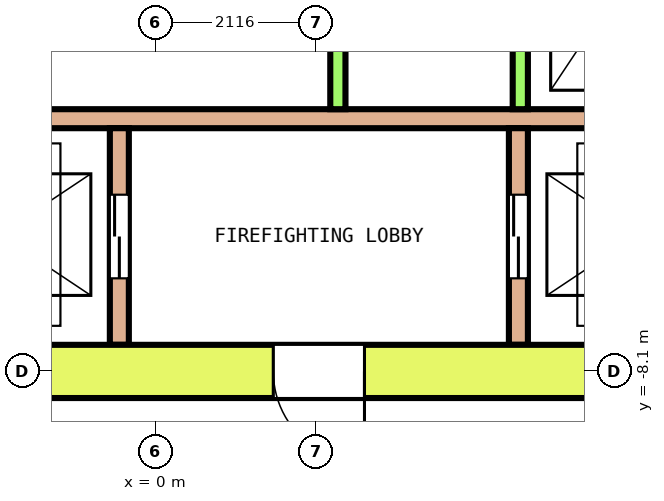
"""IFC4 building model, lengths in metres.
Left out: names, types, materials, properties, quantities, classifications, styles, units other than length and angle.
Written with IfcOpenShell. Run it as: python <this file> out.ifc"""

import sys

from ifc_helpers import new_model, si_unit, direction, frame, frame_2d, origin, place, context, subcontext, project, spatial, rectangle, extrude, element, fill, save


model = new_model("IFC4")
c1 = context("Model", 3, precision=1e-05, world=origin(), true_north=direction((0.0, 1.0)))
c2 = subcontext(c1, "Body", "Model", "MODEL_VIEW")
j1 = project(units=[si_unit("LENGTHUNIT", "METRE"), si_unit("PLANEANGLEUNIT", "RADIAN")], contexts=[c1])
p1 = place(None, origin())
s1 = spatial("IfcSite", under=j1, at=p1, CompositionType="ELEMENT")
p2 = place(p1, origin())
s2 = spatial("IfcBuilding", under=s1, at=p2, CompositionType="ELEMENT")
p3 = place(p2, frame((0.0, 0.0, 149.6)))
s3 = spatial("IfcBuildingStorey", under=s2, at=p3, CompositionType="ELEMENT", Elevation=149.6)
p4 = place(p3, frame((-13.55, -8.1, 0.0), z_axis=(0.0, 0.0, 1.0), x_axis=(1.0, 0.0, 0.0)))
e1 = element("IfcWall", 1, at=p4, inside=s3, PredefinedType="SHEAR", context=c2, shape_type="SweptSolid", body=[
    extrude(rectangle(XDim=27.1, YDim=0.7, at=frame_2d((13.55, 0.0))), origin(), (0.0, 0.0, 1.0), 4.1),
])
p5 = place(p4, frame((15.1, 0.0, 0.0)))
e2 = element("IfcOpeningElement", 2, at=p5, cuts=e1, PredefinedType="OPENING", context=c2, shape_type="SweptSolid", body=[
    extrude(rectangle(XDim=1.2, YDim=2.1, at=frame_2d((0.6, 1.05))), frame((0.0, 0.36, 0.0), z_axis=(0.0, -1.0, 0.0), x_axis=(1.0, 0.0, 0.0)), (0.0, 0.0, 1.0), 0.72),
])
p6 = place(p3, frame((-9.35, -4.775, 0.0), z_axis=(0.0, 0.0, 1.0), x_axis=(1.0, 0.0, 0.0)))
e3 = element("IfcWall", 3, at=p6, inside=s3, PredefinedType="SOLIDWALL", context=c2, shape_type="SweptSolid", body=[
    extrude(rectangle(XDim=18.7, YDim=0.25, at=frame_2d((9.35, 0.0))), origin(), (0.0, 0.0, 1.0), 4.1),
])
for number, where, z_axis, x_axis in (
    (4, (2.4, -4.65, 0.0), (0.0, 0.0, 1.0), (0.0, 1.0, 0.0)),
    (5, (4.8, -4.65, 0.0), (0.0, 0.0, 1.0), (0.0, 1.0, 0.0)),
):
    element("IfcWall", number, at=place(p3, frame(where, z_axis=z_axis, x_axis=x_axis)), inside=s3, PredefinedType="SOLIDWALL", context=c2, shape_type="SweptSolid", body=[
        extrude(rectangle(XDim=2.9, YDim=0.2, at=frame_2d((1.45, 0.0))), origin(), (0.0, 0.0, 1.0), 4.1),
    ])
p7 = place(p3, frame((-0.475, -7.75, 0.0), z_axis=(0.0, 0.0, 1.0), x_axis=(0.0, 1.0, 0.0)))
e6 = element("IfcWall", 6, at=p7, inside=s3, PredefinedType="SOLIDWALL", context=c2, shape_type="SweptSolid", body=[
    extrude(rectangle(XDim=2.85, YDim=0.25, at=frame_2d((1.425, 0.0))), origin(), (0.0, 0.0, 1.0), 4.1),
])
p8 = place(p7, frame((0.875, 0.0, 0.0)))
e7 = element("IfcOpeningElement", 7, at=p8, cuts=e6, PredefinedType="OPENING", context=c2, shape_type="SweptSolid", body=[
    extrude(rectangle(XDim=1.1, YDim=2.1, at=frame_2d((0.55, 1.05))), frame((0.0, 0.135, 0.0), z_axis=(0.0, -1.0, 0.0), x_axis=(1.0, 0.0, 0.0)), (0.0, 0.0, 1.0), 0.27),
])
p9 = place(p3, frame((4.775, -7.75, 0.0), z_axis=(0.0, 0.0, 1.0), x_axis=(0.0, 1.0, 0.0)))
e8 = element("IfcWall", 8, at=p9, inside=s3, PredefinedType="SOLIDWALL", context=c2, shape_type="SweptSolid", body=[
    extrude(rectangle(XDim=2.85, YDim=0.25, at=frame_2d((1.425, 0.0))), origin(), (0.0, 0.0, 1.0), 4.1),
])
p10 = place(p9, frame((0.875, 0.0, 0.0)))
e9 = element("IfcOpeningElement", 9, at=p10, cuts=e8, PredefinedType="OPENING", context=c2, shape_type="SweptSolid", body=[
    extrude(rectangle(XDim=1.1, YDim=2.1, at=frame_2d((0.55, 1.05))), frame((0.0, 0.135, 0.0), z_axis=(0.0, -1.0, 0.0), x_axis=(1.0, 0.0, 0.0)), (0.0, 0.0, 1.0), 0.27),
])
p11 = place(p8, origin())
e10 = element("IfcDoor", 10, at=p11, inside=s3, OperationType="DOUBLE_DOOR_SLIDING", PredefinedType="DOOR", context=c2, shape_type="SweptSolid", body=[
    extrude(rectangle(XDim=1.1, YDim=2.1, at=frame_2d((0.55, 1.05))), frame((0.0, 0.075, 0.0), z_axis=(0.0, -1.0, 0.0), x_axis=(1.0, 0.0, 0.0)), (0.0, 0.0, 1.0), 0.15),
])
fill(e7, e10)
p12 = place(p10, origin())
e11 = element("IfcDoor", 11, at=p12, inside=s3, OperationType="DOUBLE_DOOR_SLIDING", PredefinedType="DOOR", context=c2, shape_type="SweptSolid", body=[
    extrude(rectangle(XDim=1.1, YDim=2.1, at=frame_2d((0.55, 1.05))), frame((0.0, 0.075, 0.0), z_axis=(0.0, -1.0, 0.0), x_axis=(1.0, 0.0, 0.0)), (0.0, 0.0, 1.0), 0.15),
])
fill(e9, e11)
p13 = place(p5, origin())
e12 = element("IfcDoor", 12, at=p13, inside=s3, OperationType="SINGLE_SWING_LEFT", PredefinedType="DOOR", context=c2, shape_type="SweptSolid", body=[
    extrude(rectangle(XDim=1.2, YDim=2.1, at=frame_2d((0.6, 1.05))), frame((0.0, 0.3, 0.0), z_axis=(0.0, -1.0, 0.0), x_axis=(1.0, 0.0, 0.0)), (0.0, 0.0, 1.0), 0.6),
])
fill(e2, e12)
save(model, sys.argv[1])
